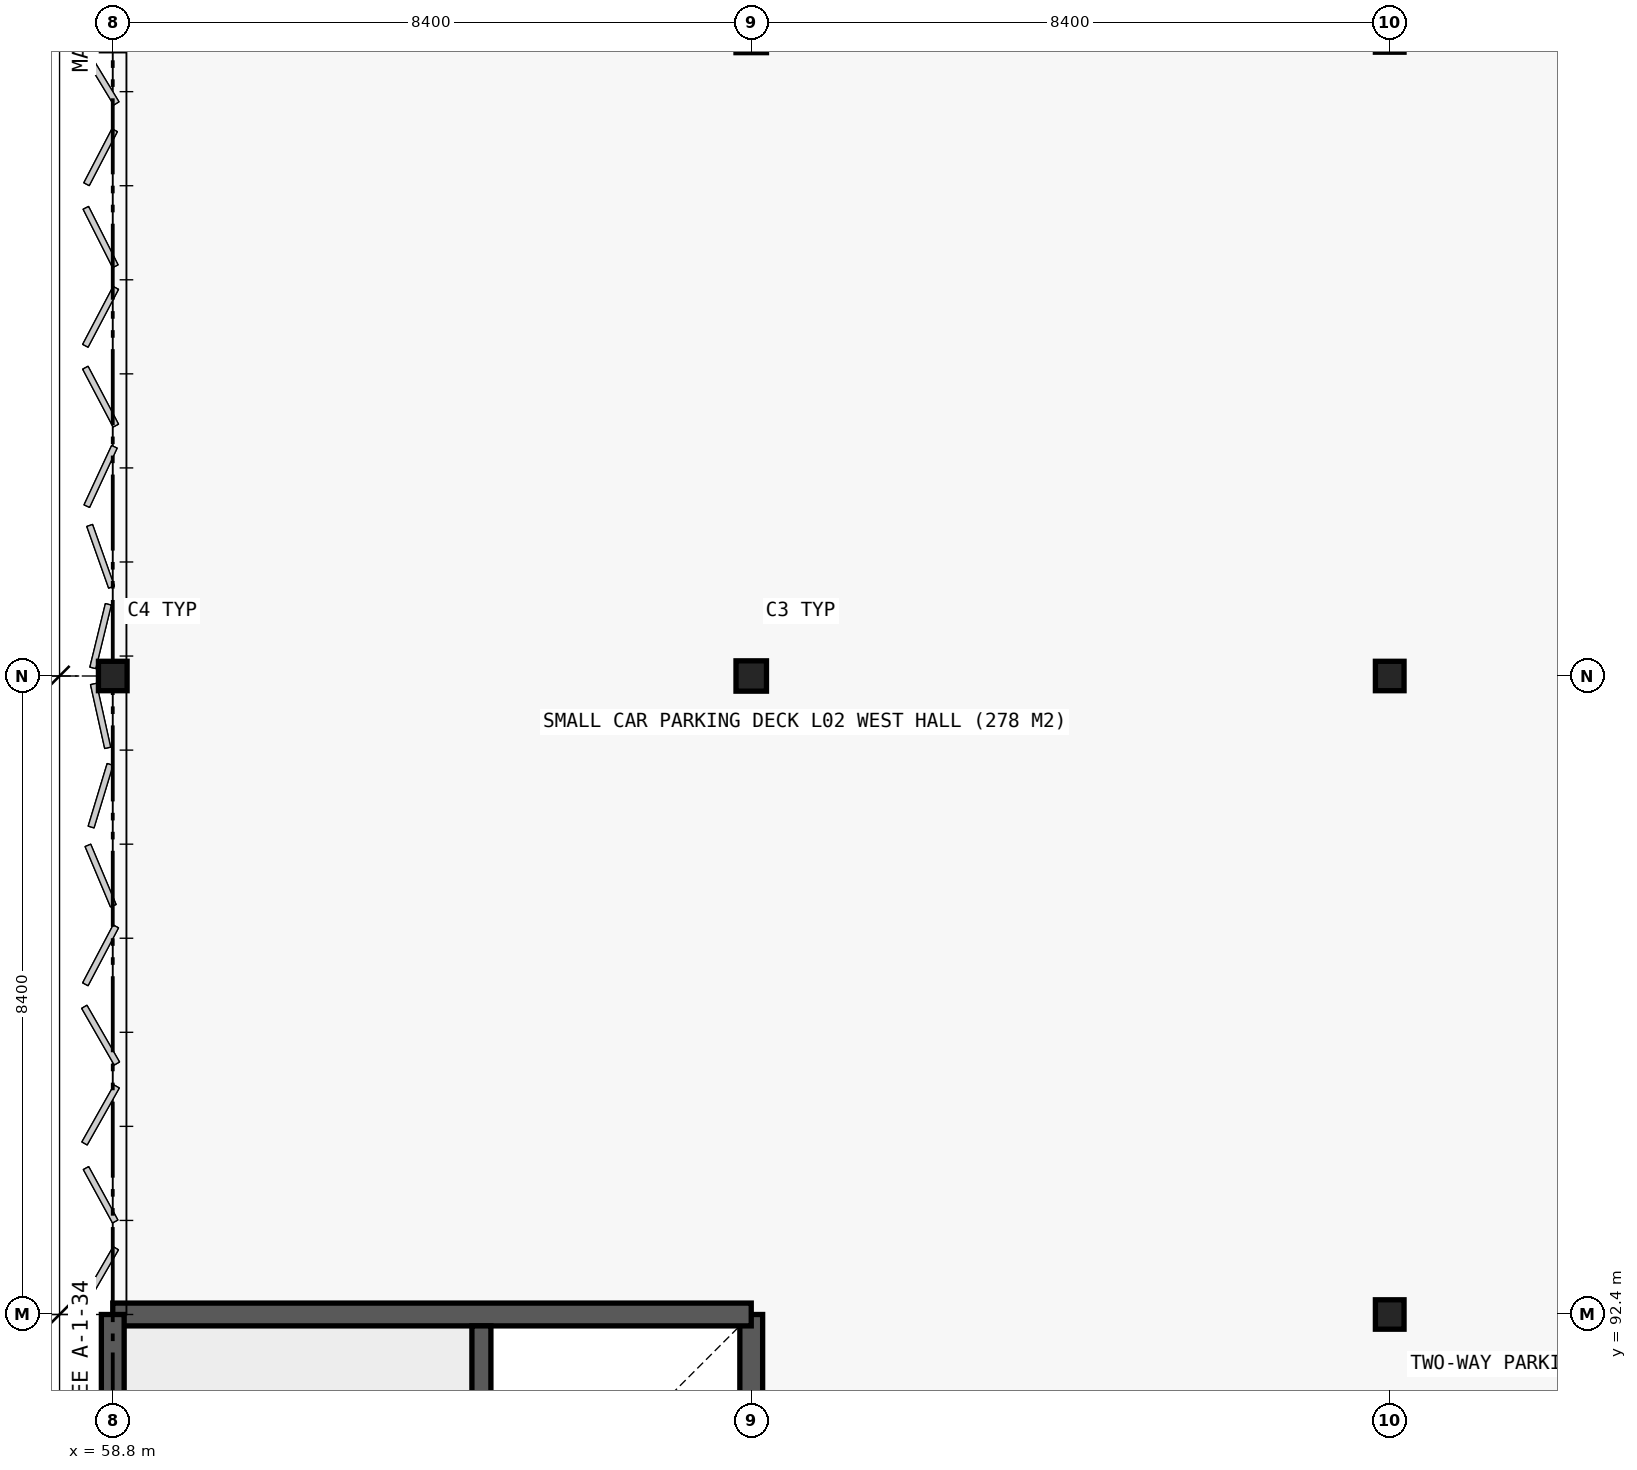
"""IFC4 building model, lengths in metres.
Left out: names, types, materials, properties, quantities, classifications, styles, units other than length and angle.
Written with IfcOpenShell. Run it as: python <this file> out.ifc"""

import sys

from ifc_helpers import new_model, si_unit, direction, frame, frame_2d, origin, origin_2d, place, context, subcontext, project, spatial, rectangle, i_section, extrude, element, save


model = new_model("IFC4")
c1 = context("Model", 3, precision=1e-05, world=origin(), true_north=direction((0.0, 1.0)))
c2 = subcontext(c1, "Body", "Model", "MODEL_VIEW")
j1 = project(units=[si_unit("LENGTHUNIT", "METRE"), si_unit("PLANEANGLEUNIT", "RADIAN")], contexts=[c1])
p1 = place(None, origin())
s1 = spatial("IfcSite", under=j1, at=p1, CompositionType="ELEMENT")
p2 = place(p1, origin())
s2 = spatial("IfcBuilding", under=s1, at=p2, CompositionType="ELEMENT")
p3 = place(p2, frame((0.0, 0.0, 9.0)))
s3 = spatial("IfcBuildingStorey", under=s2, at=p3, CompositionType="ELEMENT", Elevation=9.0)
p4 = place(p3, frame((67.2, 84.0, 0.0), z_axis=(0.0, 0.0, 1.0), x_axis=(0.0, 1.0, 0.0)))
e1 = element("IfcWall", 1, at=p4, inside=s3, PredefinedType="SHEAR", context=c2, shape_type="SweptSolid", body=[
    extrude(rectangle(XDim=8.4, YDim=0.3, at=frame_2d((4.2, 0.0))), origin(), (0.0, 0.0, 1.0), 4.2),
])
p5 = place(p4, frame((4.55, 0.0, 0.0)))
e2 = element("IfcOpeningElement", 2, at=p5, cuts=e1, PredefinedType="OPENING", context=c2, shape_type="SweptSolid", body=[
    extrude(rectangle(XDim=1.1, YDim=2.2, at=frame_2d((0.55, 1.1))), frame((0.0, 0.16, 0.0), z_axis=(0.0, -1.0, 0.0), x_axis=(1.0, 0.0, 0.0)), (0.0, 0.0, 1.0), 0.32),
])
for number, where, z_axis, x_axis in (
    (3, (67.2, 92.4, 0.0), (0.0, 0.0, 1.0), (-1.0, 0.0, 0.0)),
    (4, (58.8, 92.4, 0.0), (0.0, 0.0, 1.0), (0.0, -1.0, 0.0)),
):
    element("IfcWall", number, at=place(p3, frame(where, z_axis=z_axis, x_axis=x_axis)), inside=s3, PredefinedType="SHEAR", context=c2, shape_type="SweptSolid", body=[
        extrude(rectangle(XDim=8.4, YDim=0.3, at=frame_2d((4.2, 0.0))), origin(), (0.0, 0.0, 1.0), 4.2),
    ])
p6 = place(p3, frame((63.65, 84.15, 0.0), z_axis=(0.0, 0.0, 1.0), x_axis=(0.0, 1.0, 0.0)))
e5 = element("IfcWall", 5, at=p6, inside=s3, PredefinedType="SHEAR", context=c2, shape_type="SweptSolid", body=[
    extrude(rectangle(XDim=8.1, YDim=0.25, at=frame_2d((4.05, 0.0))), origin(), (0.0, 0.0, 1.0), 4.2),
])
p7 = place(p3, frame((58.8, 100.8, 0.0), z_axis=(0.0, 0.0, 1.0), x_axis=(1.0, 0.0, 0.0)))
e6 = element("IfcColumn", 6, at=p7, inside=s3, PredefinedType="COLUMN", context=c2, shape_type="SweptSolid", body=[
    extrude(i_section(OverallWidth=0.377, OverallDepth=0.387, WebThickness=0.022, FlangeThickness=0.036, FilletRadius=0.015, at=origin_2d()), origin(), (0.0, 0.0, 1.0), 4.2),
])
p8 = place(p3, frame((67.2, 100.8, 0.0), z_axis=(0.0, 0.0, 1.0), x_axis=(1.0, 0.0, 0.0)))
e7 = element("IfcColumn", 7, at=p8, inside=s3, PredefinedType="COLUMN", context=c2, shape_type="SweptSolid", body=[
    extrude(i_section(OverallWidth=0.401, OverallDepth=0.399, WebThickness=0.025, FlangeThickness=0.04, FilletRadius=0.015, at=origin_2d()), origin(), (0.0, 0.0, 1.0), 4.2),
])
for number, where, z_axis, x_axis in (
    (8, (75.6, 92.4, 0.0), (0.0, 0.0, 1.0), (1.0, 0.0, 0.0)),
    (9, (75.6, 100.8, 0.0), (0.0, 0.0, 1.0), (1.0, 0.0, 0.0)),
):
    element("IfcColumn", number, at=place(p3, frame(where, z_axis=z_axis, x_axis=x_axis)), inside=s3, PredefinedType="COLUMN", context=c2, shape_type="SweptSolid", body=[
        extrude(i_section(OverallWidth=0.377, OverallDepth=0.387, WebThickness=0.022, FlangeThickness=0.036, FilletRadius=0.015, at=origin_2d()), origin(), (0.0, 0.0, 1.0), 4.2),
    ])
save(model, sys.argv[1])
